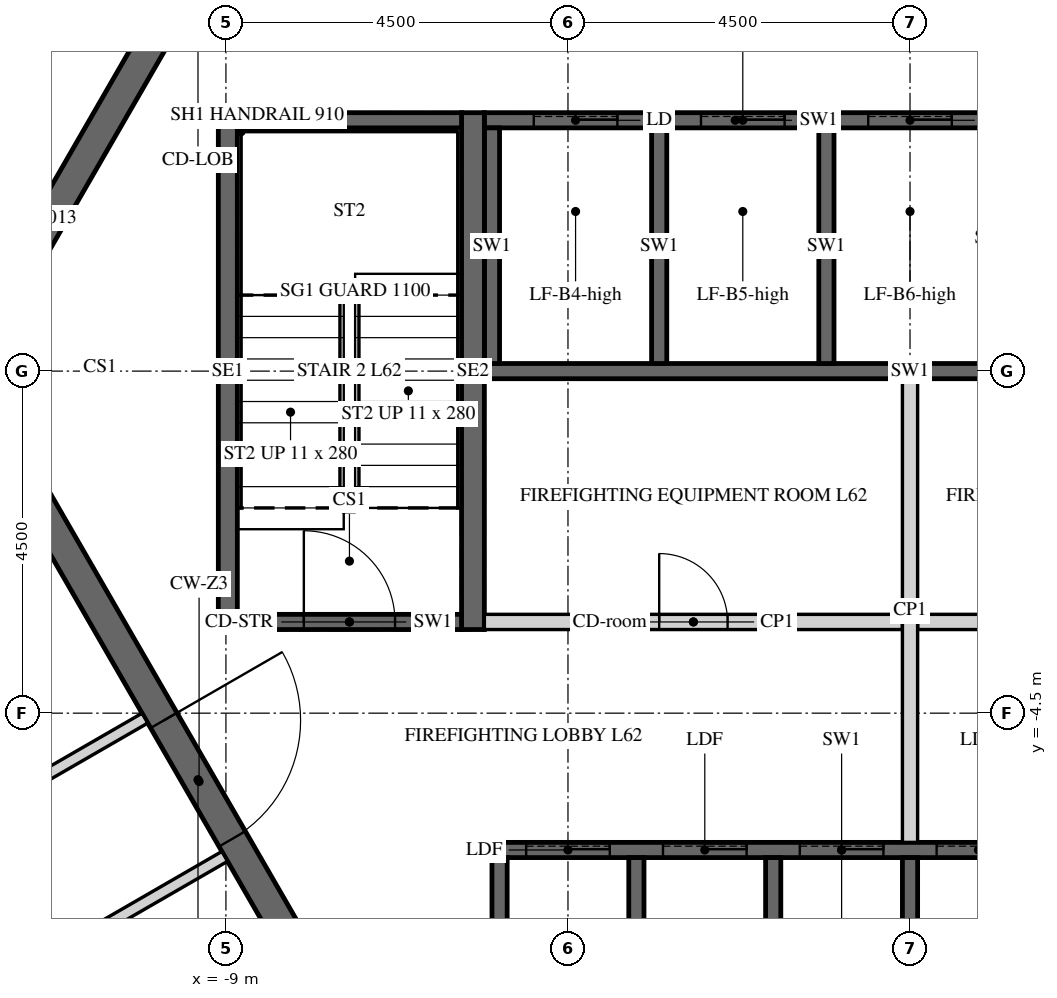
"""IFC4 building model, lengths in metres.
Left out: names, types, materials, properties, quantities, classifications, styles, units other than length and angle.
Written with IfcOpenShell. Run it as: python <this file> out.ifc"""

import sys

from ifc_helpers import new_model, si_unit, direction, frame, frame_2d, origin, place, context, subcontext, project, spatial, polyline, rectangle, outline, extrude, element, fill, save


model = new_model("IFC4")
c1 = context("Model", 3, precision=1e-05, world=origin(), true_north=direction((0.0, 1.0)))
c2 = subcontext(c1, "Body", "Model", "MODEL_VIEW")
j1 = project(units=[si_unit("LENGTHUNIT", "METRE"), si_unit("PLANEANGLEUNIT", "RADIAN")], contexts=[c1])
p1 = place(None, origin())
s1 = spatial("IfcSite", under=j1, at=p1, CompositionType="ELEMENT")
p2 = place(p1, origin())
s2 = spatial("IfcBuilding", under=s1, at=p2, CompositionType="ELEMENT")
p3 = place(p2, frame((0.0, 0.0, 260.1)))
s3 = spatial("IfcBuildingStorey", under=s2, at=p3, CompositionType="ELEMENT", Elevation=260.1)
p4 = place(p3, frame((-6.235, 10.8, -0.15), z_axis=(0.0, 0.0, 1.0), x_axis=(-0.499996419489, -0.866027470984, 0.0)))
e1 = element("IfcWall", 1, at=p4, inside=s3, PredefinedType="SHEAR", context=c2, shape_type="SweptSolid", body=[
    extrude(outline(polyline([(-0.115, -0.2), (12.586, -0.2), (12.355, 0.2), (0.115, 0.2), (-0.115, -0.2)])), origin(), (0.0, 0.0, 1.0), 3.9),
])
p5 = place(p4, frame((5.364, 0.0, 0.15)))
e2 = element("IfcOpeningElement", 2, at=p5, cuts=e1, PredefinedType="OPENING", context=c2, shape_type="SweptSolid", body=[
    extrude(rectangle(XDim=1.8, YDim=2.4, at=frame_2d((0.9, 1.2))), frame((0.0, 0.21, 0.0), z_axis=(0.0, -1.0, 0.0), x_axis=(1.0, 0.0, 0.0)), (0.0, 0.0, 1.0), 0.42),
])
p6 = place(p3, frame((-12.471, 0.0, -0.15), z_axis=(0.0, 0.0, 1.0), x_axis=(0.499996419489, -0.866027470984, 0.0)))
e3 = element("IfcWall", 3, at=p6, inside=s3, PredefinedType="SHEAR", context=c2, shape_type="SweptSolid", body=[
    extrude(outline(polyline([(-0.115, -0.2), (12.586, -0.2), (12.355, 0.2), (0.115, 0.2), (-0.115, -0.2)])), origin(), (0.0, 0.0, 1.0), 3.9),
])
p7 = place(p6, frame((5.306, 0.0, 0.15)))
e4 = element("IfcOpeningElement", 4, at=p7, cuts=e3, PredefinedType="OPENING", context=c2, shape_type="SweptSolid", body=[
    extrude(rectangle(XDim=1.8, YDim=2.4, at=frame_2d((0.9, 1.2))), frame((0.0, 0.21, 0.0), z_axis=(0.0, -1.0, 0.0), x_axis=(1.0, 0.0, 0.0)), (0.0, 0.0, 1.0), 0.42),
])
p8 = place(p3, frame((-5.6, 3.3, -0.25), z_axis=(0.0, 0.0, 1.0), x_axis=(1.0, 0.0, 0.0)))
e5 = element("IfcWall", 5, at=p8, inside=s3, PredefinedType="SHEAR", context=c2, shape_type="SweptSolid", body=[
    extrude(rectangle(XDim=6.6, YDim=0.2, at=frame_2d((3.3, 0.0))), origin(), (0.0, 0.0, 1.0), 3.9),
])
p9 = place(p8, frame((0.65, 0.0, 0.25)))
e6 = element("IfcOpeningElement", 6, at=p9, cuts=e5, PredefinedType="OPENING", context=c2, shape_type="SweptSolid", body=[
    extrude(rectangle(XDim=1.1, YDim=2.1, at=frame_2d((0.55, 1.05))), frame((0.0, 0.11, 0.0), z_axis=(0.0, -1.0, 0.0), x_axis=(1.0, 0.0, 0.0)), (0.0, 0.0, 1.0), 0.22),
])
p10 = place(p8, frame((2.85, 0.0, 0.25)))
e7 = element("IfcOpeningElement", 7, at=p10, cuts=e5, PredefinedType="OPENING", context=c2, shape_type="SweptSolid", body=[
    extrude(rectangle(XDim=1.1, YDim=2.1, at=frame_2d((0.55, 1.05))), frame((0.0, 0.11, 0.0), z_axis=(0.0, -1.0, 0.0), x_axis=(1.0, 0.0, 0.0)), (0.0, 0.0, 1.0), 0.22),
])
p11 = place(p8, frame((5.05, 0.0, 0.25)))
e8 = element("IfcOpeningElement", 8, at=p11, cuts=e5, PredefinedType="OPENING", context=c2, shape_type="SweptSolid", body=[
    extrude(rectangle(XDim=1.1, YDim=2.1, at=frame_2d((0.55, 1.05))), frame((0.0, 0.11, 0.0), z_axis=(0.0, -1.0, 0.0), x_axis=(1.0, 0.0, 0.0)), (0.0, 0.0, 1.0), 0.22),
])
p12 = place(p3, frame((-5.6, 0.0, -0.25), z_axis=(0.0, 0.0, 1.0), x_axis=(1.0, 0.0, 0.0)))
e9 = element("IfcWall", 9, at=p12, inside=s3, PredefinedType="SHEAR", context=c2, shape_type="SweptSolid", body=[
    extrude(rectangle(XDim=11.2, YDim=0.2, at=frame_2d((5.6, 0.0))), origin(), (0.0, 0.0, 1.0), 3.9),
])
for number, where, z_axis, x_axis in (
    (10, (-5.5, 0.1, -0.25), (0.0, 0.0, 1.0), (0.0, 1.0, 0.0)),
    (11, (-3.3, 0.1, -0.25), (0.0, 0.0, 1.0), (0.0, 1.0, 0.0)),
    (12, (-1.1, 0.1, -0.25), (0.0, 0.0, 1.0), (0.0, 1.0, 0.0)),
):
    element("IfcWall", number, at=place(p3, frame(where, z_axis=z_axis, x_axis=x_axis)), inside=s3, PredefinedType="SHEAR", context=c2, shape_type="SweptSolid", body=[
        extrude(rectangle(XDim=3.1, YDim=0.2, at=frame_2d((1.55, 0.0))), origin(), (0.0, 0.0, 1.0), 3.9),
    ])
p13 = place(p3, frame((-5.5, -6.3, -0.25), z_axis=(0.0, 0.0, 1.0), x_axis=(1.0, 0.0, 0.0)))
e13 = element("IfcWall", 13, at=p13, inside=s3, PredefinedType="SHEAR", context=c2, shape_type="SweptSolid", body=[
    extrude(rectangle(XDim=9.2, YDim=0.2, at=frame_2d((4.6, 0.0))), origin(), (0.0, 0.0, 1.0), 3.9),
])
p14 = place(p13, frame((0.45, 0.0, 0.25)))
e14 = element("IfcOpeningElement", 14, at=p14, cuts=e13, PredefinedType="OPENING", context=c2, shape_type="SweptSolid", body=[
    extrude(rectangle(XDim=1.1, YDim=2.1, at=frame_2d((0.55, 1.05))), frame((0.0, 0.11, 0.0), z_axis=(0.0, -1.0, 0.0), x_axis=(1.0, 0.0, 0.0)), (0.0, 0.0, 1.0), 0.22),
])
p15 = place(p13, frame((2.25, 0.0, 0.25)))
e15 = element("IfcOpeningElement", 15, at=p15, cuts=e13, PredefinedType="OPENING", context=c2, shape_type="SweptSolid", body=[
    extrude(rectangle(XDim=1.1, YDim=2.1, at=frame_2d((0.55, 1.05))), frame((0.0, 0.11, 0.0), z_axis=(0.0, -1.0, 0.0), x_axis=(1.0, 0.0, 0.0)), (0.0, 0.0, 1.0), 0.22),
])
p16 = place(p13, frame((4.05, 0.0, 0.25)))
e16 = element("IfcOpeningElement", 16, at=p16, cuts=e13, PredefinedType="OPENING", context=c2, shape_type="SweptSolid", body=[
    extrude(rectangle(XDim=1.1, YDim=2.1, at=frame_2d((0.55, 1.05))), frame((0.0, 0.11, 0.0), z_axis=(0.0, -1.0, 0.0), x_axis=(1.0, 0.0, 0.0)), (0.0, 0.0, 1.0), 0.22),
])
p17 = place(p13, frame((5.85, 0.0, 0.25)))
e17 = element("IfcOpeningElement", 17, at=p17, cuts=e13, PredefinedType="OPENING", context=c2, shape_type="SweptSolid", body=[
    extrude(rectangle(XDim=1.1, YDim=2.1, at=frame_2d((0.55, 1.05))), frame((0.0, 0.11, 0.0), z_axis=(0.0, -1.0, 0.0), x_axis=(1.0, 0.0, 0.0)), (0.0, 0.0, 1.0), 0.22),
])
p18 = place(p13, frame((7.65, 0.0, 0.25)))
e18 = element("IfcOpeningElement", 18, at=p18, cuts=e13, PredefinedType="OPENING", context=c2, shape_type="SweptSolid", body=[
    extrude(rectangle(XDim=1.1, YDim=2.1, at=frame_2d((0.55, 1.05))), frame((0.0, 0.11, 0.0), z_axis=(0.0, -1.0, 0.0), x_axis=(1.0, 0.0, 0.0)), (0.0, 0.0, 1.0), 0.22),
])
for number, where, z_axis, x_axis in (
    (19, (-5.4, -9.3, -0.25), (0.0, 0.0, 1.0), (0.0, 1.0, 0.0)),
    (20, (-3.6, -9.3, -0.25), (0.0, 0.0, 1.0), (0.0, 1.0, 0.0)),
    (21, (-1.8, -9.3, -0.25), (0.0, 0.0, 1.0), (0.0, 1.0, 0.0)),
    (22, (0.0, -9.3, -0.25), (0.0, 0.0, 1.0), (0.0, 1.0, 0.0)),
):
    element("IfcWall", number, at=place(p3, frame(where, z_axis=z_axis, x_axis=x_axis)), inside=s3, PredefinedType="SHEAR", context=c2, shape_type="SweptSolid", body=[
        extrude(rectangle(XDim=2.9, YDim=0.2, at=frame_2d((1.45, 0.0))), origin(), (0.0, 0.0, 1.0), 3.9),
    ])
p19 = place(p3, frame((-5.6, -3.3, 0.0), z_axis=(0.0, 0.0, 1.0), x_axis=(1.0, 0.0, 0.0)))
e23 = element("IfcWall", 23, at=p19, inside=s3, PredefinedType="PARTITIONING", context=c2, shape_type="SweptSolid", body=[
    extrude(rectangle(XDim=5.5, YDim=0.2, at=frame_2d((2.75, 0.0))), origin(), (0.0, 0.0, 1.0), 3.65),
])
p20 = place(p19, frame((2.3, 0.0, 0.0)))
e24 = element("IfcOpeningElement", 24, at=p20, cuts=e23, PredefinedType="OPENING", context=c2, shape_type="SweptSolid", body=[
    extrude(rectangle(XDim=0.9, YDim=2.1, at=frame_2d((0.45, 1.05))), frame((0.0, 0.11, 0.0), z_axis=(0.0, -1.0, 0.0), x_axis=(1.0, 0.0, 0.0)), (0.0, 0.0, 1.0), 0.22),
])
p21 = place(p3, frame((0.1, -3.3, 0.0), z_axis=(0.0, 0.0, 1.0), x_axis=(1.0, 0.0, 0.0)))
e25 = element("IfcWall", 25, at=p21, inside=s3, PredefinedType="PARTITIONING", context=c2, shape_type="SweptSolid", body=[
    extrude(rectangle(XDim=5.5, YDim=0.2, at=frame_2d((2.75, 0.0))), origin(), (0.0, 0.0, 1.0), 3.65),
])
p22 = place(p21, frame((2.3, 0.0, 0.0)))
e26 = element("IfcOpeningElement", 26, at=p22, cuts=e25, PredefinedType="OPENING", context=c2, shape_type="SweptSolid", body=[
    extrude(rectangle(XDim=0.9, YDim=2.1, at=frame_2d((0.45, 1.05))), frame((0.0, 0.11, 0.0), z_axis=(0.0, -1.0, 0.0), x_axis=(1.0, 0.0, 0.0)), (0.0, 0.0, 1.0), 0.22),
])
p23 = place(p3, frame((0.0, -6.2, 0.0), z_axis=(0.0, 0.0, 1.0), x_axis=(0.0, 1.0, 0.0)))
e27 = element("IfcWall", 27, at=p23, inside=s3, PredefinedType="PARTITIONING", context=c2, shape_type="SweptSolid", body=[
    extrude(rectangle(XDim=6.1, YDim=0.2, at=frame_2d((3.05, 0.0))), origin(), (0.0, 0.0, 1.0), 3.65),
])
p24 = place(p3, frame((-5.75, -3.4, -0.25), z_axis=(0.0, 0.0, 1.0), x_axis=(0.0, 1.0, 0.0)))
e28 = element("IfcWall", 28, at=p24, inside=s3, PredefinedType="SHEAR", context=c2, shape_type="SweptSolid", body=[
    extrude(rectangle(XDim=6.8, YDim=0.3, at=frame_2d((3.4, 0.0))), origin(), (0.0, 0.0, 1.0), 3.9),
])
p25 = place(p3, frame((-8.975, -3.4, -0.25), z_axis=(0.0, 0.0, 1.0), x_axis=(0.0, 1.0, 0.0)))
e29 = element("IfcWall", 29, at=p25, inside=s3, PredefinedType="SHEAR", context=c2, shape_type="SweptSolid", body=[
    extrude(rectangle(XDim=6.8, YDim=0.25, at=frame_2d((3.4, 0.0))), origin(), (0.0, 0.0, 1.0), 3.9),
])
p26 = place(p3, frame((-8.85, 3.3, -0.25), z_axis=(0.0, 0.0, 1.0), x_axis=(1.0, 0.0, 0.0)))
e30 = element("IfcWall", 30, at=p26, inside=s3, PredefinedType="SHEAR", context=c2, shape_type="SweptSolid", body=[
    extrude(rectangle(XDim=2.95, YDim=0.2, at=frame_2d((1.475, 0.0))), origin(), (0.0, 0.0, 1.0), 3.9),
])
p27 = place(p3, frame((-8.85, -3.3, -0.25), z_axis=(0.0, 0.0, 1.0), x_axis=(1.0, 0.0, 0.0)))
e31 = element("IfcWall", 31, at=p27, inside=s3, PredefinedType="SHEAR", context=c2, shape_type="SweptSolid", body=[
    extrude(rectangle(XDim=2.95, YDim=0.2, at=frame_2d((1.475, 0.0))), origin(), (0.0, 0.0, 1.0), 3.9),
])
p28 = place(p27, frame((0.875, 0.0, 0.25)))
e32 = element("IfcOpeningElement", 32, at=p28, cuts=e31, PredefinedType="OPENING", context=c2, shape_type="SweptSolid", body=[
    extrude(rectangle(XDim=1.2, YDim=2.4, at=frame_2d((0.6, 1.2))), frame((0.0, 0.11, 0.0), z_axis=(0.0, -1.0, 0.0), x_axis=(1.0, 0.0, 0.0)), (0.0, 0.0, 1.0), 0.22),
])
p29 = place(p3, frame((-8.622, 17.225, 0.0), z_axis=(0.0, 0.0, 1.0), x_axis=(-0.438366544921, -0.898796290765, 0.0)))
e33 = element("IfcWall", 33, at=p29, inside=s3, PredefinedType="PARTITIONING", context=c2, shape_type="SweptSolid", body=[
    extrude(rectangle(XDim=17.273, YDim=0.15, at=frame_2d((8.637, 0.0))), origin(), (0.0, 0.0, 1.0), 2.823),
])
p30 = place(p29, frame((6.478, 0.0, 0.0)))
e34 = element("IfcOpeningElement", 34, at=p30, cuts=e33, PredefinedType="OPENING", context=c2, shape_type="SweptSolid", body=[
    extrude(rectangle(XDim=1.0, YDim=2.1, at=frame_2d((0.5, 1.05))), frame((0.0, 0.085, 0.0), z_axis=(0.0, -1.0, 0.0), x_axis=(1.0, 0.0, 0.0)), (0.0, 0.0, 1.0), 0.17),
])
p31 = place(p3, frame((-18.338, -2.838, 0.0), z_axis=(0.0, 0.0, 1.0), x_axis=(0.499999693481, -0.866025580753, 0.0)))
e35 = element("IfcWall", 35, at=p31, inside=s3, PredefinedType="PARTITIONING", context=c2, shape_type="SweptSolid", body=[
    extrude(rectangle(XDim=15.296, YDim=0.15, at=frame_2d((7.648, 0.0))), origin(), (0.0, 0.0, 1.0), 2.823),
])
p32 = place(p31, frame((2.925, 0.0, 0.0)))
e36 = element("IfcOpeningElement", 36, at=p32, cuts=e35, PredefinedType="OPENING", context=c2, shape_type="SweptSolid", body=[
    extrude(rectangle(XDim=1.0, YDim=2.1, at=frame_2d((0.5, 1.05))), frame((0.0, 0.085, 0.0), z_axis=(0.0, -1.0, 0.0), x_axis=(1.0, 0.0, 0.0)), (0.0, 0.0, 1.0), 0.17),
])
p33 = place(p31, frame((14.136, 0.0, 0.0)))
e37 = element("IfcOpeningElement", 37, at=p33, cuts=e35, PredefinedType="OPENING", context=c2, shape_type="SweptSolid", body=[
    extrude(rectangle(XDim=1.0, YDim=2.1, at=frame_2d((0.5, 1.05))), frame((0.0, 0.085, 0.0), z_axis=(0.0, -1.0, 0.0), x_axis=(1.0, 0.0, 0.0)), (0.0, 0.0, 1.0), 0.17),
])
p34 = place(p3, frame((-10.066, -4.566, 0.0), z_axis=(0.0, 0.0, 1.0), x_axis=(-0.866037363387, -0.499979284789, 0.0)))
e38 = element("IfcWall", 38, at=p34, inside=s3, PredefinedType="PARTITIONING", context=c2, shape_type="SweptSolid", body=[
    extrude(rectangle(XDim=4.8, YDim=0.15, at=frame_2d((2.4, 0.0))), origin(), (0.0, 0.0, 1.0), 2.823),
])
p35 = place(p3, frame((-13.108, -8.747, 0.0), z_axis=(0.0, 0.0, 1.0), x_axis=(0.866024684746, 0.500001245408, 0.0)))
e39 = element("IfcWall", 39, at=p35, inside=s3, PredefinedType="PARTITIONING", context=c2, shape_type="SweptSolid", body=[
    extrude(rectangle(XDim=4.725, YDim=0.15, at=frame_2d((2.363, 0.0))), origin(), (0.0, 0.0, 1.0), 2.823),
])
p36 = place(p7, origin())
e40 = element("IfcDoor", 40, at=p36, inside=s3, OperationType="DOUBLE_DOOR_SINGLE_SWING", PredefinedType="DOOR", context=c2, shape_type="SweptSolid", body=[
    extrude(rectangle(XDim=1.8, YDim=2.4, at=frame_2d((0.9, 1.2))), frame((0.0, 0.025, 0.0), z_axis=(0.0, -1.0, 0.0), x_axis=(1.0, 0.0, 0.0)), (0.0, 0.0, 1.0), 0.05),
])
fill(e4, e40)
p37 = place(p20, origin())
e41 = element("IfcDoor", 41, at=p37, inside=s3, OperationType="SINGLE_SWING_LEFT", PredefinedType="DOOR", context=c2, shape_type="SweptSolid", body=[
    extrude(rectangle(XDim=0.9, YDim=2.1, at=frame_2d((0.45, 1.05))), frame((0.0, 0.025, 0.0), z_axis=(0.0, -1.0, 0.0), x_axis=(1.0, 0.0, 0.0)), (0.0, 0.0, 1.0), 0.05),
])
fill(e24, e41)
p38 = place(p28, origin())
e42 = element("IfcDoor", 42, at=p38, inside=s3, OperationType="SINGLE_SWING_LEFT", PredefinedType="DOOR", context=c2, shape_type="SweptSolid", body=[
    extrude(rectangle(XDim=1.2, YDim=2.4, at=frame_2d((0.6, 1.2))), frame((0.0, 0.025, 0.0), z_axis=(0.0, -1.0, 0.0), x_axis=(1.0, 0.0, 0.0)), (0.0, 0.0, 1.0), 0.05),
])
fill(e32, e42)
p39 = place(p9, origin())
e43 = element("IfcDoor", 43, at=p39, inside=s3, OperationType="SLIDING_TO_LEFT", PredefinedType="DOOR", context=c2, shape_type="SweptSolid", body=[
    extrude(rectangle(XDim=1.1, YDim=2.1, at=frame_2d((0.55, 1.05))), frame((0.0, 0.025, 0.0), z_axis=(0.0, -1.0, 0.0), x_axis=(1.0, 0.0, 0.0)), (0.0, 0.0, 1.0), 0.05),
])
fill(e6, e43)
p40 = place(p10, origin())
e44 = element("IfcDoor", 44, at=p40, inside=s3, OperationType="SLIDING_TO_LEFT", PredefinedType="DOOR", context=c2, shape_type="SweptSolid", body=[
    extrude(rectangle(XDim=1.1, YDim=2.1, at=frame_2d((0.55, 1.05))), frame((0.0, 0.025, 0.0), z_axis=(0.0, -1.0, 0.0), x_axis=(1.0, 0.0, 0.0)), (0.0, 0.0, 1.0), 0.05),
])
fill(e7, e44)
p41 = place(p11, origin())
e45 = element("IfcDoor", 45, at=p41, inside=s3, OperationType="SLIDING_TO_LEFT", PredefinedType="DOOR", context=c2, shape_type="SweptSolid", body=[
    extrude(rectangle(XDim=1.1, YDim=2.1, at=frame_2d((0.55, 1.05))), frame((0.0, 0.025, 0.0), z_axis=(0.0, -1.0, 0.0), x_axis=(1.0, 0.0, 0.0)), (0.0, 0.0, 1.0), 0.05),
])
fill(e8, e45)
p42 = place(p14, origin())
e46 = element("IfcDoor", 46, at=p42, inside=s3, OperationType="SLIDING_TO_LEFT", PredefinedType="DOOR", context=c2, shape_type="SweptSolid", body=[
    extrude(rectangle(XDim=1.1, YDim=2.1, at=frame_2d((0.55, 1.05))), frame((0.0, 0.025, 0.0), z_axis=(0.0, -1.0, 0.0), x_axis=(1.0, 0.0, 0.0)), (0.0, 0.0, 1.0), 0.05),
])
fill(e14, e46)
p43 = place(p15, origin())
e47 = element("IfcDoor", 47, at=p43, inside=s3, OperationType="SLIDING_TO_LEFT", PredefinedType="DOOR", context=c2, shape_type="SweptSolid", body=[
    extrude(rectangle(XDim=1.1, YDim=2.1, at=frame_2d((0.55, 1.05))), frame((0.0, 0.025, 0.0), z_axis=(0.0, -1.0, 0.0), x_axis=(1.0, 0.0, 0.0)), (0.0, 0.0, 1.0), 0.05),
])
fill(e15, e47)
p44 = place(p16, origin())
e48 = element("IfcDoor", 48, at=p44, inside=s3, OperationType="SLIDING_TO_LEFT", PredefinedType="DOOR", context=c2, shape_type="SweptSolid", body=[
    extrude(rectangle(XDim=1.1, YDim=2.1, at=frame_2d((0.55, 1.05))), frame((0.0, 0.025, 0.0), z_axis=(0.0, -1.0, 0.0), x_axis=(1.0, 0.0, 0.0)), (0.0, 0.0, 1.0), 0.05),
])
fill(e16, e48)
p45 = place(p17, origin())
e49 = element("IfcDoor", 49, at=p45, inside=s3, OperationType="SLIDING_TO_LEFT", PredefinedType="DOOR", context=c2, shape_type="SweptSolid", body=[
    extrude(rectangle(XDim=1.1, YDim=2.1, at=frame_2d((0.55, 1.05))), frame((0.0, 0.025, 0.0), z_axis=(0.0, -1.0, 0.0), x_axis=(1.0, 0.0, 0.0)), (0.0, 0.0, 1.0), 0.05),
])
fill(e17, e49)
save(model, sys.argv[1])
